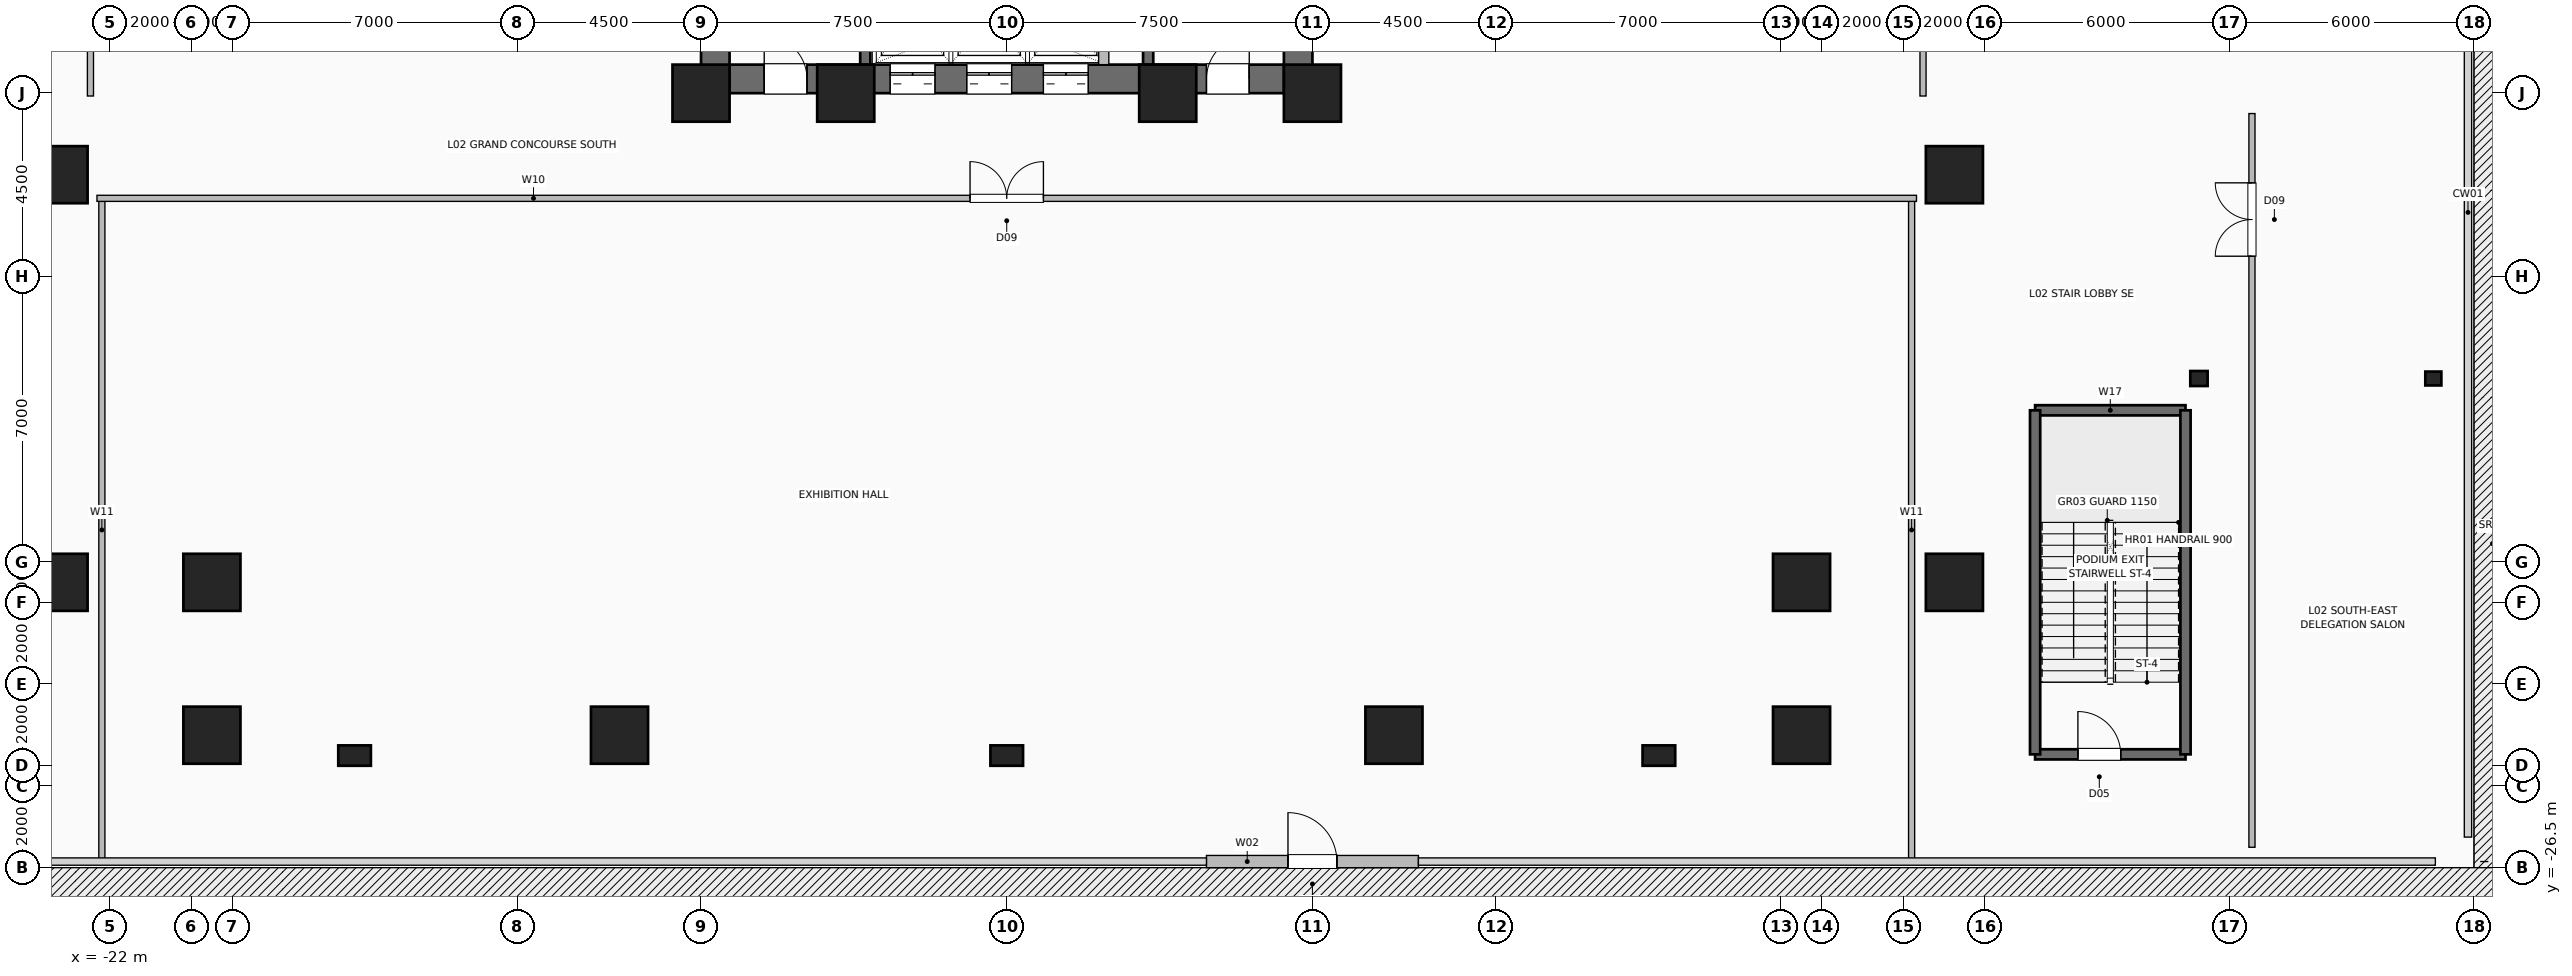
"""IFC4 building model, lengths in metres.
Left out: names, types, materials, properties, quantities, classifications, styles, units other than length and angle.
Written with IfcOpenShell. Run it as: python <this file> out.ifc"""

import sys

from ifc_helpers import new_model, si_unit, direction, frame, frame_2d, origin, origin_2d, place, context, subcontext, project, spatial, rectangle, hollow_rectangle, i_section, extrude, element, fill, save


model = new_model("IFC4")
c1 = context("Model", 3, precision=1e-05, world=origin(), true_north=direction((0.0, 1.0)))
c2 = subcontext(c1, "Body", "Model", "MODEL_VIEW")
j1 = project(units=[si_unit("LENGTHUNIT", "METRE"), si_unit("PLANEANGLEUNIT", "RADIAN")], contexts=[c1])
p1 = place(None, origin())
s1 = spatial("IfcSite", under=j1, at=p1, CompositionType="ELEMENT")
p2 = place(p1, origin())
s2 = spatial("IfcBuilding", under=s1, at=p2, CompositionType="ELEMENT")
p3 = place(p2, frame((0.0, 0.0, 10.8)))
s3 = spatial("IfcBuildingStorey", under=s2, at=p3, CompositionType="ELEMENT", Elevation=10.8)
for number, where, z_axis, x_axis in (
    (1, (-7.5, -7.5, 0.0), (0.0, 0.0, 1.0), (1.0, 0.0, 0.0)),
    (2, (-3.95, -7.5, 0.0), (0.0, 0.0, 1.0), (1.0, 0.0, 0.0)),
    (3, (3.95, -7.5, 0.0), (0.0, 0.0, 1.0), (1.0, 0.0, 0.0)),
    (4, (7.5, -7.5, 0.0), (0.0, 0.0, 1.0), (1.0, 0.0, 0.0)),
    (5, (-19.5, -23.25, 0.0), (0.0, 0.0, 1.0), (1.0, 0.0, 0.0)),
    (6, (-9.5, -23.25, 0.0), (0.0, 0.0, 1.0), (1.0, 0.0, 0.0)),
    (7, (9.5, -23.25, 0.0), (0.0, 0.0, 1.0), (1.0, 0.0, 0.0)),
    (8, (19.5, -23.25, 0.0), (0.0, 0.0, 1.0), (1.0, 0.0, 0.0)),
    (9, (-23.25, -19.5, 0.0), (0.0, 0.0, 1.0), (1.0, 0.0, 0.0)),
    (10, (-23.25, -9.5, 0.0), (0.0, 0.0, 1.0), (1.0, 0.0, 0.0)),
    (11, (23.25, -19.5, 0.0), (0.0, 0.0, 1.0), (1.0, 0.0, 0.0)),
    (12, (23.25, -9.5, 0.0), (0.0, 0.0, 1.0), (1.0, 0.0, 0.0)),
    (13, (-19.5, -19.5, 0.0), (0.0, 0.0, 1.0), (1.0, 0.0, 0.0)),
    (14, (19.5, -19.5, 0.0), (0.0, 0.0, 1.0), (1.0, 0.0, 0.0)),
):
    element("IfcColumn", number, at=place(p3, frame(where, z_axis=z_axis, x_axis=x_axis)), inside=s3, PredefinedType="COLUMN", context=c2, shape_type="SweptSolid", body=[
        extrude(hollow_rectangle(XDim=1.4, YDim=1.4, WallThickness=0.06, at=origin_2d()), origin(), (0.0, 0.0, 1.0), 5.4),
    ])
p4 = place(p3, frame((29.25, -14.5, 0.0), z_axis=(0.0, 0.0, 1.0), x_axis=(1.0, 0.0, 0.0)))
e15 = element("IfcColumn", 15, at=p4, inside=s3, PredefinedType="COLUMN", context=c2, shape_type="SweptSolid", body=[
    extrude(i_section(OverallWidth=0.368, OverallDepth=0.425, WebThickness=0.03, FlangeThickness=0.048, FilletRadius=0.02, at=origin_2d()), origin(), (0.0, 0.0, 1.0), 5.4),
])
p5 = place(p3, frame((35.0, -14.5, -0.4), z_axis=(0.0, 0.0, 1.0), x_axis=(1.0, 0.0, 0.0)))
e16 = element("IfcColumn", 16, at=p5, inside=s3, PredefinedType="COLUMN", context=c2, shape_type="SweptSolid", body=[
    extrude(i_section(OverallWidth=0.34, OverallDepth=0.393, WebThickness=0.02, FlangeThickness=0.033, FilletRadius=0.02, at=origin_2d()), origin(), (0.0, 0.0, 1.0), 5.4),
])
for number, where, z_axis, x_axis in (
    (17, (-16.0, -23.75, 0.0), (0.0, 0.0, 1.0), (1.0, 0.0, 0.0)),
    (18, (0.0, -23.75, 0.0), (0.0, 0.0, 1.0), (1.0, 0.0, 0.0)),
    (19, (16.0, -23.75, 0.0), (0.0, 0.0, 1.0), (1.0, 0.0, 0.0)),
):
    element("IfcColumn", number, at=place(p3, frame(where, z_axis=z_axis, x_axis=x_axis)), inside=s3, PredefinedType="PILASTER", context=c2, shape_type="SweptSolid", body=[
        extrude(rectangle(XDim=0.5, YDim=0.8, at=origin_2d()), origin(), (0.0, 0.0, 1.0), 5.4),
    ])
p6 = place(p3, frame((4.9, -26.35, 0.0), z_axis=(0.0, 0.0, 1.0), x_axis=(1.0, 0.0, 0.0)))
e20 = element("IfcWall", 20, at=p6, inside=s3, PredefinedType="SOLIDWALL", context=c2, shape_type="SweptSolid", body=[
    extrude(rectangle(XDim=5.2, YDim=0.3, at=frame_2d((2.6, 0.0))), origin(), (0.0, 0.0, 1.0), 5.0),
])
p7 = place(p6, frame((2.0, 0.0, 0.0)))
e21 = element("IfcOpeningElement", 21, at=p7, cuts=e20, PredefinedType="OPENING", context=c2, shape_type="SweptSolid", body=[
    extrude(rectangle(XDim=1.2, YDim=2.25, at=frame_2d((0.6, 1.125))), frame((0.0, 0.16, 0.0), z_axis=(0.0, -1.0, 0.0), x_axis=(1.0, 0.0, 0.0)), (0.0, 0.0, 1.0), 0.32),
])
p8 = place(p3, frame((-7.5, -7.15, 0.0), z_axis=(0.0, 0.0, 1.0), x_axis=(1.0, 0.0, 0.0)))
e22 = element("IfcWall", 22, at=p8, inside=s3, PredefinedType="SHEAR", context=c2, shape_type="SweptSolid", body=[
    extrude(rectangle(XDim=15.0, YDim=0.7, at=frame_2d((7.5, 0.0))), origin(), (0.0, 0.0, 1.0), 5.0),
])
p9 = place(p8, frame((1.55, 0.0, 0.0)))
e23 = element("IfcOpeningElement", 23, at=p9, cuts=e22, PredefinedType="OPENING", context=c2, shape_type="SweptSolid", body=[
    extrude(rectangle(XDim=1.05, YDim=2.08, at=frame_2d((0.525, 1.04))), frame((0.0, 0.36, 0.0), z_axis=(0.0, -1.0, 0.0), x_axis=(1.0, 0.0, 0.0)), (0.0, 0.0, 1.0), 0.72),
])
p10 = place(p8, frame((12.4, 0.0, 0.0)))
e24 = element("IfcOpeningElement", 24, at=p10, cuts=e22, PredefinedType="OPENING", context=c2, shape_type="SweptSolid", body=[
    extrude(rectangle(XDim=1.05, YDim=2.08, at=frame_2d((0.525, 1.04))), frame((0.0, 0.36, 0.0), z_axis=(0.0, -1.0, 0.0), x_axis=(1.0, 0.0, 0.0)), (0.0, 0.0, 1.0), 0.72),
])
p11 = place(p8, frame((4.64, 0.0, 0.0)))
e25 = element("IfcOpeningElement", 25, at=p11, cuts=e22, PredefinedType="OPENING", context=c2, shape_type="SweptSolid", body=[
    extrude(rectangle(XDim=1.1, YDim=2.2, at=frame_2d((0.55, 1.1))), frame((0.0, 0.36, 0.0), z_axis=(0.0, -1.0, 0.0), x_axis=(1.0, 0.0, 0.0)), (0.0, 0.0, 1.0), 0.72),
])
p12 = place(p8, frame((6.52, 0.0, 0.0)))
e26 = element("IfcOpeningElement", 26, at=p12, cuts=e22, PredefinedType="OPENING", context=c2, shape_type="SweptSolid", body=[
    extrude(rectangle(XDim=1.1, YDim=2.2, at=frame_2d((0.55, 1.1))), frame((0.0, 0.36, 0.0), z_axis=(0.0, -1.0, 0.0), x_axis=(1.0, 0.0, 0.0)), (0.0, 0.0, 1.0), 0.72),
])
p13 = place(p8, frame((8.4, 0.0, 0.0)))
e27 = element("IfcOpeningElement", 27, at=p13, cuts=e22, PredefinedType="OPENING", context=c2, shape_type="SweptSolid", body=[
    extrude(rectangle(XDim=1.1, YDim=2.2, at=frame_2d((0.55, 1.1))), frame((0.0, 0.36, 0.0), z_axis=(0.0, -1.0, 0.0), x_axis=(1.0, 0.0, 0.0)), (0.0, 0.0, 1.0), 0.72),
])
p14 = place(p3, frame((-7.15, -7.5, 0.0), z_axis=(0.0, 0.0, 1.0), x_axis=(0.0, 1.0, 0.0)))
e28 = element("IfcWall", 28, at=p14, inside=s3, PredefinedType="SHEAR", context=c2, shape_type="SweptSolid", body=[
    extrude(rectangle(XDim=15.0, YDim=0.7, at=frame_2d((7.5, 0.0))), origin(), (0.0, 0.0, 1.0), 5.0),
])
p15 = place(p14, frame((9.5, 0.0, 0.0)))
e29 = element("IfcOpeningElement", 29, at=p15, cuts=e28, PredefinedType="OPENING", context=c2, shape_type="SweptSolid", body=[
    extrude(rectangle(XDim=1.0, YDim=2.08, at=frame_2d((0.5, 1.04))), frame((0.0, 0.36, 0.0), z_axis=(0.0, -1.0, 0.0), x_axis=(1.0, 0.0, 0.0)), (0.0, 0.0, 1.0), 0.72),
])
p16 = place(p3, frame((7.15, -7.5, 0.0), z_axis=(0.0, 0.0, 1.0), x_axis=(0.0, 1.0, 0.0)))
e30 = element("IfcWall", 30, at=p16, inside=s3, PredefinedType="SHEAR", context=c2, shape_type="SweptSolid", body=[
    extrude(rectangle(XDim=15.0, YDim=0.7, at=frame_2d((7.5, 0.0))), origin(), (0.0, 0.0, 1.0), 5.0),
])
p17 = place(p16, frame((12.6, 0.0, 0.0)))
e31 = element("IfcOpeningElement", 31, at=p17, cuts=e30, PredefinedType="OPENING", context=c2, shape_type="SweptSolid", body=[
    extrude(rectangle(XDim=1.2, YDim=2.2, at=frame_2d((0.6, 1.1))), frame((0.0, 0.36, 0.0), z_axis=(0.0, -1.0, 0.0), x_axis=(1.0, 0.0, 0.0)), (0.0, 0.0, 1.0), 0.72),
])
for number, where, z_axis, x_axis in (
    (32, (-3.47, -6.8, 0.0), (0.0, 0.0, 1.0), (0.0, 1.0, 0.0)),
    (33, (3.47, -6.8, 0.0), (0.0, 0.0, 1.0), (0.0, 1.0, 0.0)),
):
    element("IfcWall", number, at=place(p3, frame(where, z_axis=z_axis, x_axis=x_axis)), inside=s3, PredefinedType="SHEAR", context=c2, shape_type="SweptSolid", body=[
        extrude(rectangle(XDim=7.72, YDim=0.25, at=frame_2d((3.86, 0.0))), origin(), (0.0, 0.0, 1.0), 5.0),
    ])
p18 = place(p3, frame((2.38, -6.8, 0.0), z_axis=(0.0, 0.0, 1.0), x_axis=(0.0, 1.0, 0.0)))
e34 = element("IfcWall", 34, at=p18, inside=s3, PredefinedType="SHEAR", context=c2, shape_type="SweptSolid", body=[
    extrude(rectangle(XDim=2.22, YDim=0.25, at=frame_2d((1.11, 0.0))), origin(), (0.0, 0.0, 1.0), 5.0),
])
p19 = place(p3, frame((25.23, -23.72, 0.0), z_axis=(0.0, 0.0, 1.0), x_axis=(1.0, 0.0, 0.0)))
e35 = element("IfcWall", 35, at=p19, inside=s3, PredefinedType="SHEAR", context=c2, shape_type="SweptSolid", body=[
    extrude(rectangle(XDim=3.69, YDim=0.25, at=frame_2d((1.845, 0.0))), origin(), (0.0, 0.0, 1.0), 5.0),
])
p20 = place(p19, frame((1.05, 0.0, 0.0)))
e36 = element("IfcOpeningElement", 36, at=p20, cuts=e35, PredefinedType="OPENING", context=c2, shape_type="SweptSolid", body=[
    extrude(rectangle(XDim=1.05, YDim=2.08, at=frame_2d((0.525, 1.04))), frame((0.0, 0.135, 0.0), z_axis=(0.0, -1.0, 0.0), x_axis=(1.0, 0.0, 0.0)), (0.0, 0.0, 1.0), 0.27),
])
p21 = place(p3, frame((25.23, -15.28, 0.0), z_axis=(0.0, 0.0, 1.0), x_axis=(1.0, 0.0, 0.0)))
e37 = element("IfcWall", 37, at=p21, inside=s3, PredefinedType="SHEAR", context=c2, shape_type="SweptSolid", body=[
    extrude(rectangle(XDim=3.69, YDim=0.25, at=frame_2d((1.845, 0.0))), origin(), (0.0, 0.0, 1.0), 5.0),
])
for number, where, z_axis, x_axis in (
    (38, (25.23, -23.72, 0.0), (0.0, 0.0, 1.0), (0.0, 1.0, 0.0)),
    (39, (28.92, -23.72, 0.0), (0.0, 0.0, 1.0), (0.0, 1.0, 0.0)),
):
    element("IfcWall", number, at=place(p3, frame(where, z_axis=z_axis, x_axis=x_axis)), inside=s3, PredefinedType="SHEAR", context=c2, shape_type="SweptSolid", body=[
        extrude(rectangle(XDim=8.44, YDim=0.25, at=frame_2d((4.22, 0.0))), origin(), (0.0, 0.0, 1.0), 5.0),
    ])
for number, where, z_axis, x_axis in (
    (40, (-22.2, -26.35, 0.0), (0.0, 0.0, 1.0), (0.0, 1.0, 0.0)),
    (41, (22.2, -26.35, 0.0), (0.0, 0.0, 1.0), (0.0, 1.0, 0.0)),
):
    element("IfcWall", number, at=place(p3, frame(where, z_axis=z_axis, x_axis=x_axis)), inside=s3, PredefinedType="PARTITIONING", context=c2, shape_type="SweptSolid", body=[
        extrude(rectangle(XDim=16.27, YDim=0.15, at=frame_2d((8.135, 0.0))), origin(), (0.0, 0.0, 1.0), 5.0),
    ])
p22 = place(p3, frame((-22.32, -10.08, 0.0), z_axis=(0.0, 0.0, 1.0), x_axis=(1.0, 0.0, 0.0)))
e42 = element("IfcWall", 42, at=p22, inside=s3, PredefinedType="PARTITIONING", context=c2, shape_type="SweptSolid", body=[
    extrude(rectangle(XDim=44.64, YDim=0.15, at=frame_2d((22.32, 0.0))), origin(), (0.0, 0.0, 1.0), 5.0),
])
p23 = place(p22, frame((21.42, 0.0, 0.0)))
e43 = element("IfcOpeningElement", 43, at=p23, cuts=e42, PredefinedType="OPENING", context=c2, shape_type="SweptSolid", body=[
    extrude(rectangle(XDim=1.8, YDim=2.08, at=frame_2d((0.9, 1.04))), frame((0.0, 0.085, 0.0), z_axis=(0.0, -1.0, 0.0), x_axis=(1.0, 0.0, 0.0)), (0.0, 0.0, 1.0), 0.17),
])
p24 = place(p3, frame((-22.48, -7.57, 0.0), z_axis=(0.0, 0.0, 1.0), x_axis=(0.0, 1.0, 0.0)))
e44 = element("IfcWall", 44, at=p24, inside=s3, PredefinedType="PARTITIONING", context=c2, shape_type="SweptSolid", body=[
    extrude(rectangle(XDim=12.29, YDim=0.15, at=frame_2d((6.145, 0.0))), origin(), (0.0, 0.0, 1.0), 5.0),
])
p25 = place(p24, frame((2.08, 0.0, 0.0)))
e45 = element("IfcOpeningElement", 45, at=p25, cuts=e44, PredefinedType="OPENING", context=c2, shape_type="SweptSolid", body=[
    extrude(rectangle(XDim=0.95, YDim=2.06, at=frame_2d((0.475, 1.03))), frame((0.0, 0.085, 0.0), z_axis=(0.0, -1.0, 0.0), x_axis=(1.0, 0.0, 0.0)), (0.0, 0.0, 1.0), 0.17),
])
p26 = place(p24, frame((8.145, 0.0, 0.0)))
e46 = element("IfcOpeningElement", 46, at=p26, cuts=e44, PredefinedType="OPENING", context=c2, shape_type="SweptSolid", body=[
    extrude(rectangle(XDim=0.95, YDim=2.06, at=frame_2d((0.475, 1.03))), frame((0.0, 0.085, 0.0), z_axis=(0.0, -1.0, 0.0), x_axis=(1.0, 0.0, 0.0)), (0.0, 0.0, 1.0), 0.17),
])
p27 = place(p3, frame((22.48, -7.57, 0.0), z_axis=(0.0, 0.0, 1.0), x_axis=(0.0, 1.0, 0.0)))
e47 = element("IfcWall", 47, at=p27, inside=s3, PredefinedType="PARTITIONING", context=c2, shape_type="SweptSolid", body=[
    extrude(rectangle(XDim=9.24, YDim=0.15, at=frame_2d((4.62, 0.0))), origin(), (0.0, 0.0, 1.0), 5.0),
])
p28 = place(p27, frame((1.58, 0.0, 0.0)))
e48 = element("IfcOpeningElement", 48, at=p28, cuts=e47, PredefinedType="OPENING", context=c2, shape_type="SweptSolid", body=[
    extrude(rectangle(XDim=0.95, YDim=2.06, at=frame_2d((0.475, 1.03))), frame((0.0, 0.085, 0.0), z_axis=(0.0, -1.0, 0.0), x_axis=(1.0, 0.0, 0.0)), (0.0, 0.0, 1.0), 0.17),
])
p29 = place(p27, frame((4.985, 0.0, 0.0)))
e49 = element("IfcOpeningElement", 49, at=p29, cuts=e47, PredefinedType="OPENING", context=c2, shape_type="SweptSolid", body=[
    extrude(rectangle(XDim=0.85, YDim=2.05, at=frame_2d((0.425, 1.025))), frame((0.0, 0.085, 0.0), z_axis=(0.0, -1.0, 0.0), x_axis=(1.0, 0.0, 0.0)), (0.0, 0.0, 1.0), 0.17),
])
p30 = place(p27, frame((7.46, 0.0, 0.0)))
e50 = element("IfcOpeningElement", 50, at=p30, cuts=e47, PredefinedType="OPENING", context=c2, shape_type="SweptSolid", body=[
    extrude(rectangle(XDim=0.95, YDim=2.06, at=frame_2d((0.475, 1.03))), frame((0.0, 0.085, 0.0), z_axis=(0.0, -1.0, 0.0), x_axis=(1.0, 0.0, 0.0)), (0.0, 0.0, 1.0), 0.17),
])
p31 = place(p3, frame((30.55, -26.0, 0.0), z_axis=(0.0, 0.0, 1.0), x_axis=(0.0, 1.0, 0.0)))
e51 = element("IfcWall", 51, at=p31, inside=s3, PredefinedType="PARTITIONING", context=c2, shape_type="SweptSolid", body=[
    extrude(rectangle(XDim=18.0, YDim=0.15, at=frame_2d((9.0, 0.0))), origin(), (0.0, 0.0, 1.0), 5.0),
])
p32 = place(p31, frame((14.5, 0.0, 0.0)))
e52 = element("IfcOpeningElement", 52, at=p32, cuts=e51, PredefinedType="OPENING", context=c2, shape_type="SweptSolid", body=[
    extrude(rectangle(XDim=1.8, YDim=2.08, at=frame_2d((0.9, 1.04))), frame((0.0, 0.085, 0.0), z_axis=(0.0, -1.0, 0.0), x_axis=(1.0, 0.0, 0.0)), (0.0, 0.0, 1.0), 0.17),
])
p33 = place(p7, origin())
e53 = element("IfcDoor", 53, at=p33, inside=s3, OperationType="SINGLE_SWING_LEFT", PredefinedType="DOOR", context=c2, shape_type="SweptSolid", body=[
    extrude(rectangle(XDim=1.2, YDim=2.25, at=frame_2d((0.6, 1.125))), frame((0.0, 0.025, 0.0), z_axis=(0.0, -1.0, 0.0), x_axis=(1.0, 0.0, 0.0)), (0.0, 0.0, 1.0), 0.05),
])
fill(e21, e53)
p34 = place(p9, origin())
e54 = element("IfcDoor", 54, at=p34, inside=s3, OperationType="SINGLE_SWING_LEFT", PredefinedType="DOOR", context=c2, shape_type="SweptSolid", body=[
    extrude(rectangle(XDim=1.05, YDim=2.08, at=frame_2d((0.525, 1.04))), frame((0.0, 0.025, 0.0), z_axis=(0.0, -1.0, 0.0), x_axis=(1.0, 0.0, 0.0)), (0.0, 0.0, 1.0), 0.05),
])
fill(e23, e54)
p35 = place(p10, origin())
e55 = element("IfcDoor", 55, at=p35, inside=s3, OperationType="SINGLE_SWING_RIGHT", PredefinedType="DOOR", context=c2, shape_type="SweptSolid", body=[
    extrude(rectangle(XDim=1.05, YDim=2.08, at=frame_2d((0.525, 1.04))), frame((0.0, 0.025, 0.0), z_axis=(0.0, -1.0, 0.0), x_axis=(1.0, 0.0, 0.0)), (0.0, 0.0, 1.0), 0.05),
])
fill(e24, e55)
p36 = place(p11, origin())
e56 = element("IfcDoor", 56, at=p36, inside=s3, OperationType="DOUBLE_DOOR_SLIDING", PredefinedType="DOOR", context=c2, shape_type="SweptSolid", body=[
    extrude(rectangle(XDim=1.1, YDim=2.2, at=frame_2d((0.55, 1.1))), frame((0.0, 0.025, 0.0), z_axis=(0.0, -1.0, 0.0), x_axis=(1.0, 0.0, 0.0)), (0.0, 0.0, 1.0), 0.05),
])
fill(e25, e56)
p37 = place(p12, origin())
e57 = element("IfcDoor", 57, at=p37, inside=s3, OperationType="DOUBLE_DOOR_SLIDING", PredefinedType="DOOR", context=c2, shape_type="SweptSolid", body=[
    extrude(rectangle(XDim=1.1, YDim=2.2, at=frame_2d((0.55, 1.1))), frame((0.0, 0.025, 0.0), z_axis=(0.0, -1.0, 0.0), x_axis=(1.0, 0.0, 0.0)), (0.0, 0.0, 1.0), 0.05),
])
fill(e26, e57)
p38 = place(p13, origin())
e58 = element("IfcDoor", 58, at=p38, inside=s3, OperationType="DOUBLE_DOOR_SLIDING", PredefinedType="DOOR", context=c2, shape_type="SweptSolid", body=[
    extrude(rectangle(XDim=1.1, YDim=2.2, at=frame_2d((0.55, 1.1))), frame((0.0, 0.025, 0.0), z_axis=(0.0, -1.0, 0.0), x_axis=(1.0, 0.0, 0.0)), (0.0, 0.0, 1.0), 0.05),
])
fill(e27, e58)
p39 = place(p20, origin())
e59 = element("IfcDoor", 59, at=p39, inside=s3, OperationType="SINGLE_SWING_LEFT", PredefinedType="DOOR", context=c2, shape_type="SweptSolid", body=[
    extrude(rectangle(XDim=1.05, YDim=2.08, at=frame_2d((0.525, 1.04))), frame((0.0, 0.025, 0.0), z_axis=(0.0, -1.0, 0.0), x_axis=(1.0, 0.0, 0.0)), (0.0, 0.0, 1.0), 0.05),
])
fill(e36, e59)
p40 = place(p23, origin())
e60 = element("IfcDoor", 60, at=p40, inside=s3, OperationType="DOUBLE_DOOR_SINGLE_SWING", PredefinedType="DOOR", context=c2, shape_type="SweptSolid", body=[
    extrude(rectangle(XDim=1.8, YDim=2.08, at=frame_2d((0.9, 1.04))), frame((0.0, 0.025, 0.0), z_axis=(0.0, -1.0, 0.0), x_axis=(1.0, 0.0, 0.0)), (0.0, 0.0, 1.0), 0.05),
])
fill(e43, e60)
p41 = place(p32, origin())
e61 = element("IfcDoor", 61, at=p41, inside=s3, OperationType="DOUBLE_DOOR_SINGLE_SWING", PredefinedType="DOOR", context=c2, shape_type="SweptSolid", body=[
    extrude(rectangle(XDim=1.8, YDim=2.08, at=frame_2d((0.9, 1.04))), frame((0.0, 0.025, 0.0), z_axis=(0.0, -1.0, 0.0), x_axis=(1.0, 0.0, 0.0)), (0.0, 0.0, 1.0), 0.05),
])
fill(e52, e61)
save(model, sys.argv[1])
